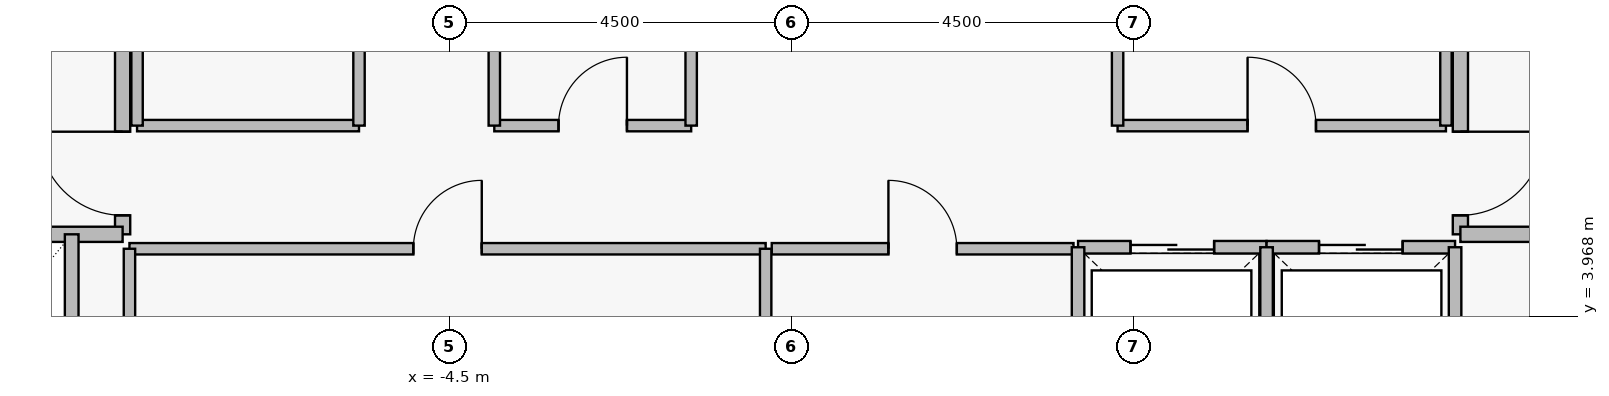
"""IFC4 building model, lengths in metres.
Left out: names, types, materials, properties, quantities, classifications, styles, units other than length and angle.
Written with IfcOpenShell. Run it as: python <this file> out.ifc"""

import sys

from ifc_helpers import new_model, si_unit, direction, frame, frame_2d, origin, place, context, subcontext, project, spatial, rectangle, extrude, element, fill, save


model = new_model("IFC4")
c1 = context("Model", 3, precision=1e-05, world=origin(), true_north=direction((0.0, 1.0)))
c2 = subcontext(c1, "Body", "Model", "MODEL_VIEW")
j1 = project(units=[si_unit("LENGTHUNIT", "METRE"), si_unit("PLANEANGLEUNIT", "RADIAN")], contexts=[c1])
p1 = place(None, origin())
s1 = spatial("IfcSite", under=j1, at=p1, CompositionType="ELEMENT")
p2 = place(p1, origin())
s2 = spatial("IfcBuilding", under=s1, at=p2, CompositionType="ELEMENT")
p3 = place(p2, frame((0.0, 0.0, 288.45)))
s3 = spatial("IfcBuildingStorey", under=s2, at=p3, CompositionType="ELEMENT", Elevation=288.45)
p4 = place(p3, frame((-8.8, 5.05, 0.0), z_axis=(0.0, 0.0, 1.0), x_axis=(0.0, 1.0, 0.0)))
e1 = element("IfcWall", 1, at=p4, inside=s3, PredefinedType="PARTITIONING", context=c2, shape_type="SweptSolid", body=[
    extrude(rectangle(XDim=6.1, YDim=0.2, at=frame_2d((3.05, 0.0))), origin(), (0.0, 0.0, 1.0), 4.18),
])
p5 = place(p4, frame((0.25, 0.0, 0.0)))
e2 = element("IfcOpeningElement", 2, at=p5, cuts=e1, PredefinedType="OPENING", context=c2, shape_type="SweptSolid", body=[
    extrude(rectangle(XDim=1.1, YDim=2.2, at=frame_2d((0.55, 1.1))), frame((0.0, 0.11, 0.0), z_axis=(0.0, -1.0, 0.0), x_axis=(1.0, 0.0, 0.0)), (0.0, 0.0, 1.0), 0.22),
])
p6 = place(p4, frame((3.85, 0.0, 0.0)))
e3 = element("IfcOpeningElement", 3, at=p6, cuts=e1, PredefinedType="OPENING", context=c2, shape_type="SweptSolid", body=[
    extrude(rectangle(XDim=1.1, YDim=2.2, at=frame_2d((0.55, 1.1))), frame((0.0, 0.11, 0.0), z_axis=(0.0, -1.0, 0.0), x_axis=(1.0, 0.0, 0.0)), (0.0, 0.0, 1.0), 0.22),
])
p7 = place(p3, frame((8.8, 11.15, 0.0), z_axis=(0.0, 0.0, 1.0), x_axis=(0.0, -1.0, 0.0)))
e4 = element("IfcWall", 4, at=p7, inside=s3, PredefinedType="PARTITIONING", context=c2, shape_type="SweptSolid", body=[
    extrude(rectangle(XDim=6.1, YDim=0.2, at=frame_2d((3.05, 0.0))), origin(), (0.0, 0.0, 1.0), 4.18),
])
p8 = place(p7, frame((1.15, 0.0, 0.0)))
e5 = element("IfcOpeningElement", 5, at=p8, cuts=e4, PredefinedType="OPENING", context=c2, shape_type="SweptSolid", body=[
    extrude(rectangle(XDim=1.1, YDim=2.2, at=frame_2d((0.55, 1.1))), frame((0.0, 0.11, 0.0), z_axis=(0.0, -1.0, 0.0), x_axis=(1.0, 0.0, 0.0)), (0.0, 0.0, 1.0), 0.22),
])
p9 = place(p7, frame((4.75, 0.0, 0.0)))
e6 = element("IfcOpeningElement", 6, at=p9, cuts=e4, PredefinedType="OPENING", context=c2, shape_type="SweptSolid", body=[
    extrude(rectangle(XDim=1.1, YDim=2.2, at=frame_2d((0.55, 1.1))), frame((0.0, 0.11, 0.0), z_axis=(0.0, -1.0, 0.0), x_axis=(1.0, 0.0, 0.0)), (0.0, 0.0, 1.0), 0.22),
])
p10 = place(p3, frame((3.77, 4.88, 0.0), z_axis=(0.0, 0.0, 1.0), x_axis=(1.0, 0.0, 0.0)))
e7 = element("IfcWall", 7, at=p10, inside=s3, PredefinedType="PARTITIONING", context=c2, shape_type="SweptSolid", body=[
    extrude(rectangle(XDim=2.48, YDim=0.165, at=frame_2d((1.24, 0.0))), origin(), (0.0, 0.0, 1.0), 4.18),
])
p11 = place(p10, frame((0.69, 0.0, 0.0)))
e8 = element("IfcOpeningElement", 8, at=p11, cuts=e7, PredefinedType="OPENING", context=c2, shape_type="SweptSolid", body=[
    extrude(rectangle(XDim=1.1, YDim=2.25, at=frame_2d((0.55, 1.125))), frame((0.0, 0.093, 0.0), z_axis=(0.0, -1.0, 0.0), x_axis=(1.0, 0.0, 0.0)), (0.0, 0.0, 1.0), 0.185),
])
p12 = place(p3, frame((6.25, 4.88, 0.0), z_axis=(0.0, 0.0, 1.0), x_axis=(1.0, 0.0, 0.0)))
e9 = element("IfcWall", 9, at=p12, inside=s3, PredefinedType="PARTITIONING", context=c2, shape_type="SweptSolid", body=[
    extrude(rectangle(XDim=2.48, YDim=0.165, at=frame_2d((1.24, 0.0))), origin(), (0.0, 0.0, 1.0), 4.18),
])
p13 = place(p12, frame((0.69, 0.0, 0.0)))
e10 = element("IfcOpeningElement", 10, at=p13, cuts=e9, PredefinedType="OPENING", context=c2, shape_type="SweptSolid", body=[
    extrude(rectangle(XDim=1.1, YDim=2.25, at=frame_2d((0.55, 1.125))), frame((0.0, 0.093, 0.0), z_axis=(0.0, -1.0, 0.0), x_axis=(1.0, 0.0, 0.0)), (0.0, 0.0, 1.0), 0.185),
])
p14 = place(p3, frame((-8.71, 4.86, 0.0), z_axis=(0.0, 0.0, 1.0), x_axis=(1.0, 0.0, 0.0)))
e11 = element("IfcWall", 11, at=p14, inside=s3, PredefinedType="PARTITIONING", context=c2, shape_type="SweptSolid", body=[
    extrude(rectangle(XDim=8.37, YDim=0.15, at=frame_2d((4.185, 0.0))), origin(), (0.0, 0.0, 1.0), 4.18),
])
p15 = place(p14, frame((3.735, 0.0, 0.0)))
e12 = element("IfcOpeningElement", 12, at=p15, cuts=e11, PredefinedType="OPENING", context=c2, shape_type="SweptSolid", body=[
    extrude(rectangle(XDim=0.9, YDim=2.15, at=frame_2d((0.45, 1.075))), frame((0.0, 0.085, 0.0), z_axis=(0.0, -1.0, 0.0), x_axis=(1.0, 0.0, 0.0)), (0.0, 0.0, 1.0), 0.17),
])
p16 = place(p3, frame((-0.26, 4.86, 0.0), z_axis=(0.0, 0.0, 1.0), x_axis=(1.0, 0.0, 0.0)))
e13 = element("IfcWall", 13, at=p16, inside=s3, PredefinedType="PARTITIONING", context=c2, shape_type="SweptSolid", body=[
    extrude(rectangle(XDim=3.97, YDim=0.15, at=frame_2d((1.985, 0.0))), origin(), (0.0, 0.0, 1.0), 4.18),
])
p17 = place(p16, frame((1.535, 0.0, 0.0)))
e14 = element("IfcOpeningElement", 14, at=p17, cuts=e13, PredefinedType="OPENING", context=c2, shape_type="SweptSolid", body=[
    extrude(rectangle(XDim=0.9, YDim=2.15, at=frame_2d((0.45, 1.075))), frame((0.0, 0.085, 0.0), z_axis=(0.0, -1.0, 0.0), x_axis=(1.0, 0.0, 0.0)), (0.0, 0.0, 1.0), 0.17),
])
p18 = place(p3, frame((-3.91, 6.48, 0.0), z_axis=(0.0, 0.0, 1.0), x_axis=(1.0, 0.0, 0.0)))
e15 = element("IfcWall", 15, at=p18, inside=s3, PredefinedType="PARTITIONING", context=c2, shape_type="SweptSolid", body=[
    extrude(rectangle(XDim=2.59, YDim=0.15, at=frame_2d((1.295, 0.0))), origin(), (0.0, 0.0, 1.0), 4.18),
])
p19 = place(p18, frame((0.845, 0.0, 0.0)))
e16 = element("IfcOpeningElement", 16, at=p19, cuts=e15, PredefinedType="OPENING", context=c2, shape_type="SweptSolid", body=[
    extrude(rectangle(XDim=0.9, YDim=2.15, at=frame_2d((0.45, 1.075))), frame((0.0, 0.085, 0.0), z_axis=(0.0, -1.0, 0.0), x_axis=(1.0, 0.0, 0.0)), (0.0, 0.0, 1.0), 0.17),
])
p20 = place(p3, frame((4.29, 6.48, 0.0), z_axis=(0.0, 0.0, 1.0), x_axis=(1.0, 0.0, 0.0)))
e17 = element("IfcWall", 17, at=p20, inside=s3, PredefinedType="PARTITIONING", context=c2, shape_type="SweptSolid", body=[
    extrude(rectangle(XDim=4.32, YDim=0.15, at=frame_2d((2.16, 0.0))), origin(), (0.0, 0.0, 1.0), 4.18),
])
p21 = place(p20, frame((1.71, 0.0, 0.0)))
e18 = element("IfcOpeningElement", 18, at=p21, cuts=e17, PredefinedType="OPENING", context=c2, shape_type="SweptSolid", body=[
    extrude(rectangle(XDim=0.9, YDim=2.15, at=frame_2d((0.45, 1.075))), frame((0.0, 0.085, 0.0), z_axis=(0.0, -1.0, 0.0), x_axis=(1.0, 0.0, 0.0)), (0.0, 0.0, 1.0), 0.17),
])
for number, where, z_axis, x_axis in (
    (19, (-11.65, 5.05, 0.0), (0.0, 0.0, 1.0), (1.0, 0.0, 0.0)),
    (20, (8.8, 5.05, 0.0), (0.0, 0.0, 1.0), (1.0, 0.0, 0.0)),
):
    element("IfcWall", number, at=place(p3, frame(where, z_axis=z_axis, x_axis=x_axis)), inside=s3, PredefinedType="PARTITIONING", context=c2, shape_type="SweptSolid", body=[
        extrude(rectangle(XDim=2.85, YDim=0.2, at=frame_2d((1.425, 0.0))), origin(), (0.0, 0.0, 1.0), 4.18),
    ])
for number, where, z_axis, x_axis in (
    (21, (3.77, 2.52, 0.0), (0.0, 0.0, 1.0), (0.0, 1.0, 0.0)),
    (22, (6.25, 2.52, 0.0), (0.0, 0.0, 1.0), (0.0, 1.0, 0.0)),
    (23, (8.73, 2.52, 0.0), (0.0, 0.0, 1.0), (0.0, 1.0, 0.0)),
):
    element("IfcWall", number, at=place(p3, frame(where, z_axis=z_axis, x_axis=x_axis)), inside=s3, PredefinedType="PARTITIONING", context=c2, shape_type="SweptSolid", body=[
        extrude(rectangle(XDim=2.36, YDim=0.165, at=frame_2d((1.18, 0.0))), origin(), (0.0, 0.0, 1.0), 4.18),
    ])
for number, where, z_axis, x_axis in (
    (24, (-8.71, 2.49, 0.0), (0.0, 0.0, 1.0), (0.0, 1.0, 0.0)),
    (25, (-0.34, 2.49, 0.0), (0.0, 0.0, 1.0), (0.0, 1.0, 0.0)),
):
    element("IfcWall", number, at=place(p3, frame(where, z_axis=z_axis, x_axis=x_axis)), inside=s3, PredefinedType="PARTITIONING", context=c2, shape_type="SweptSolid", body=[
        extrude(rectangle(XDim=2.37, YDim=0.15, at=frame_2d((1.185, 0.0))), origin(), (0.0, 0.0, 1.0), 4.18),
    ])
p22 = place(p3, frame((-9.47, 2.45, 0.0), z_axis=(0.0, 0.0, 1.0), x_axis=(0.0, 1.0, 0.0)))
e26 = element("IfcWall", 26, at=p22, inside=s3, PredefinedType="PARTITIONING", context=c2, shape_type="SweptSolid", body=[
    extrude(rectangle(XDim=2.6, YDim=0.18, at=frame_2d((1.3, 0.0))), origin(), (0.0, 0.0, 1.0), 4.18),
])
p23 = place(p3, frame((-8.61, 6.48, 0.0), z_axis=(0.0, 0.0, 1.0), x_axis=(1.0, 0.0, 0.0)))
e27 = element("IfcWall", 27, at=p23, inside=s3, PredefinedType="PARTITIONING", context=c2, shape_type="SweptSolid", body=[
    extrude(rectangle(XDim=2.92, YDim=0.15, at=frame_2d((1.46, 0.0))), origin(), (0.0, 0.0, 1.0), 4.18),
])
for number, where, z_axis, x_axis in (
    (28, (-8.61, 6.48, 0.0), (0.0, 0.0, 1.0), (0.0, 1.0, 0.0)),
    (29, (-5.69, 6.48, 0.0), (0.0, 0.0, 1.0), (0.0, 1.0, 0.0)),
    (30, (-3.91, 6.48, 0.0), (0.0, 0.0, 1.0), (0.0, 1.0, 0.0)),
    (31, (-1.32, 6.48, 0.0), (0.0, 0.0, 1.0), (0.0, 1.0, 0.0)),
    (32, (4.29, 6.48, 0.0), (0.0, 0.0, 1.0), (0.0, 1.0, 0.0)),
    (33, (8.61, 6.48, 0.0), (0.0, 0.0, 1.0), (0.0, 1.0, 0.0)),
):
    element("IfcWall", number, at=place(p3, frame(where, z_axis=z_axis, x_axis=x_axis)), inside=s3, PredefinedType="PARTITIONING", context=c2, shape_type="SweptSolid", body=[
        extrude(rectangle(XDim=2.24, YDim=0.15, at=frame_2d((1.12, 0.0))), origin(), (0.0, 0.0, 1.0), 4.18),
    ])
p24 = place(p5, origin())
e34 = element("IfcDoor", 34, at=p24, inside=s3, OperationType="SINGLE_SWING_RIGHT", PredefinedType="DOOR", context=c2, shape_type="SweptSolid", body=[
    extrude(rectangle(XDim=1.1, YDim=2.2, at=frame_2d((0.55, 1.1))), frame((0.0, 0.025, 0.0), z_axis=(0.0, -1.0, 0.0), x_axis=(1.0, 0.0, 0.0)), (0.0, 0.0, 1.0), 0.05),
])
fill(e2, e34)
p25 = place(p9, origin())
e35 = element("IfcDoor", 35, at=p25, inside=s3, OperationType="SINGLE_SWING_LEFT", PredefinedType="DOOR", context=c2, shape_type="SweptSolid", body=[
    extrude(rectangle(XDim=1.1, YDim=2.2, at=frame_2d((0.55, 1.1))), frame((0.0, 0.025, 0.0), z_axis=(0.0, -1.0, 0.0), x_axis=(1.0, 0.0, 0.0)), (0.0, 0.0, 1.0), 0.05),
])
fill(e6, e35)
p26 = place(p11, origin())
e36 = element("IfcDoor", 36, at=p26, inside=s3, OperationType="SLIDING_TO_LEFT", PredefinedType="DOOR", context=c2, shape_type="SweptSolid", body=[
    extrude(rectangle(XDim=1.1, YDim=2.25, at=frame_2d((0.55, 1.125))), frame((0.0, 0.025, 0.0), z_axis=(0.0, -1.0, 0.0), x_axis=(1.0, 0.0, 0.0)), (0.0, 0.0, 1.0), 0.05),
])
fill(e8, e36)
p27 = place(p13, origin())
e37 = element("IfcDoor", 37, at=p27, inside=s3, OperationType="SLIDING_TO_LEFT", PredefinedType="DOOR", context=c2, shape_type="SweptSolid", body=[
    extrude(rectangle(XDim=1.1, YDim=2.25, at=frame_2d((0.55, 1.125))), frame((0.0, 0.025, 0.0), z_axis=(0.0, -1.0, 0.0), x_axis=(1.0, 0.0, 0.0)), (0.0, 0.0, 1.0), 0.05),
])
fill(e10, e37)
p28 = place(p15, origin())
e38 = element("IfcDoor", 38, at=p28, inside=s3, OperationType="SINGLE_SWING_RIGHT", PredefinedType="DOOR", context=c2, shape_type="SweptSolid", body=[
    extrude(rectangle(XDim=0.9, YDim=2.15, at=frame_2d((0.45, 1.075))), frame((0.0, 0.025, 0.0), z_axis=(0.0, -1.0, 0.0), x_axis=(1.0, 0.0, 0.0)), (0.0, 0.0, 1.0), 0.05),
])
fill(e12, e38)
p29 = place(p17, origin())
e39 = element("IfcDoor", 39, at=p29, inside=s3, OperationType="SINGLE_SWING_LEFT", PredefinedType="DOOR", context=c2, shape_type="SweptSolid", body=[
    extrude(rectangle(XDim=0.9, YDim=2.15, at=frame_2d((0.45, 1.075))), frame((0.0, 0.025, 0.0), z_axis=(0.0, -1.0, 0.0), x_axis=(1.0, 0.0, 0.0)), (0.0, 0.0, 1.0), 0.05),
])
fill(e14, e39)
p30 = place(p19, origin())
e40 = element("IfcDoor", 40, at=p30, inside=s3, OperationType="SINGLE_SWING_RIGHT", PredefinedType="DOOR", context=c2, shape_type="SweptSolid", body=[
    extrude(rectangle(XDim=0.9, YDim=2.15, at=frame_2d((0.45, 1.075))), frame((0.0, 0.025, 0.0), z_axis=(0.0, -1.0, 0.0), x_axis=(1.0, 0.0, 0.0)), (0.0, 0.0, 1.0), 0.05),
])
fill(e16, e40)
p31 = place(p21, origin())
e41 = element("IfcDoor", 41, at=p31, inside=s3, OperationType="SINGLE_SWING_LEFT", PredefinedType="DOOR", context=c2, shape_type="SweptSolid", body=[
    extrude(rectangle(XDim=0.9, YDim=2.15, at=frame_2d((0.45, 1.075))), frame((0.0, 0.025, 0.0), z_axis=(0.0, -1.0, 0.0), x_axis=(1.0, 0.0, 0.0)), (0.0, 0.0, 1.0), 0.05),
])
fill(e18, e41)
save(model, sys.argv[1])
